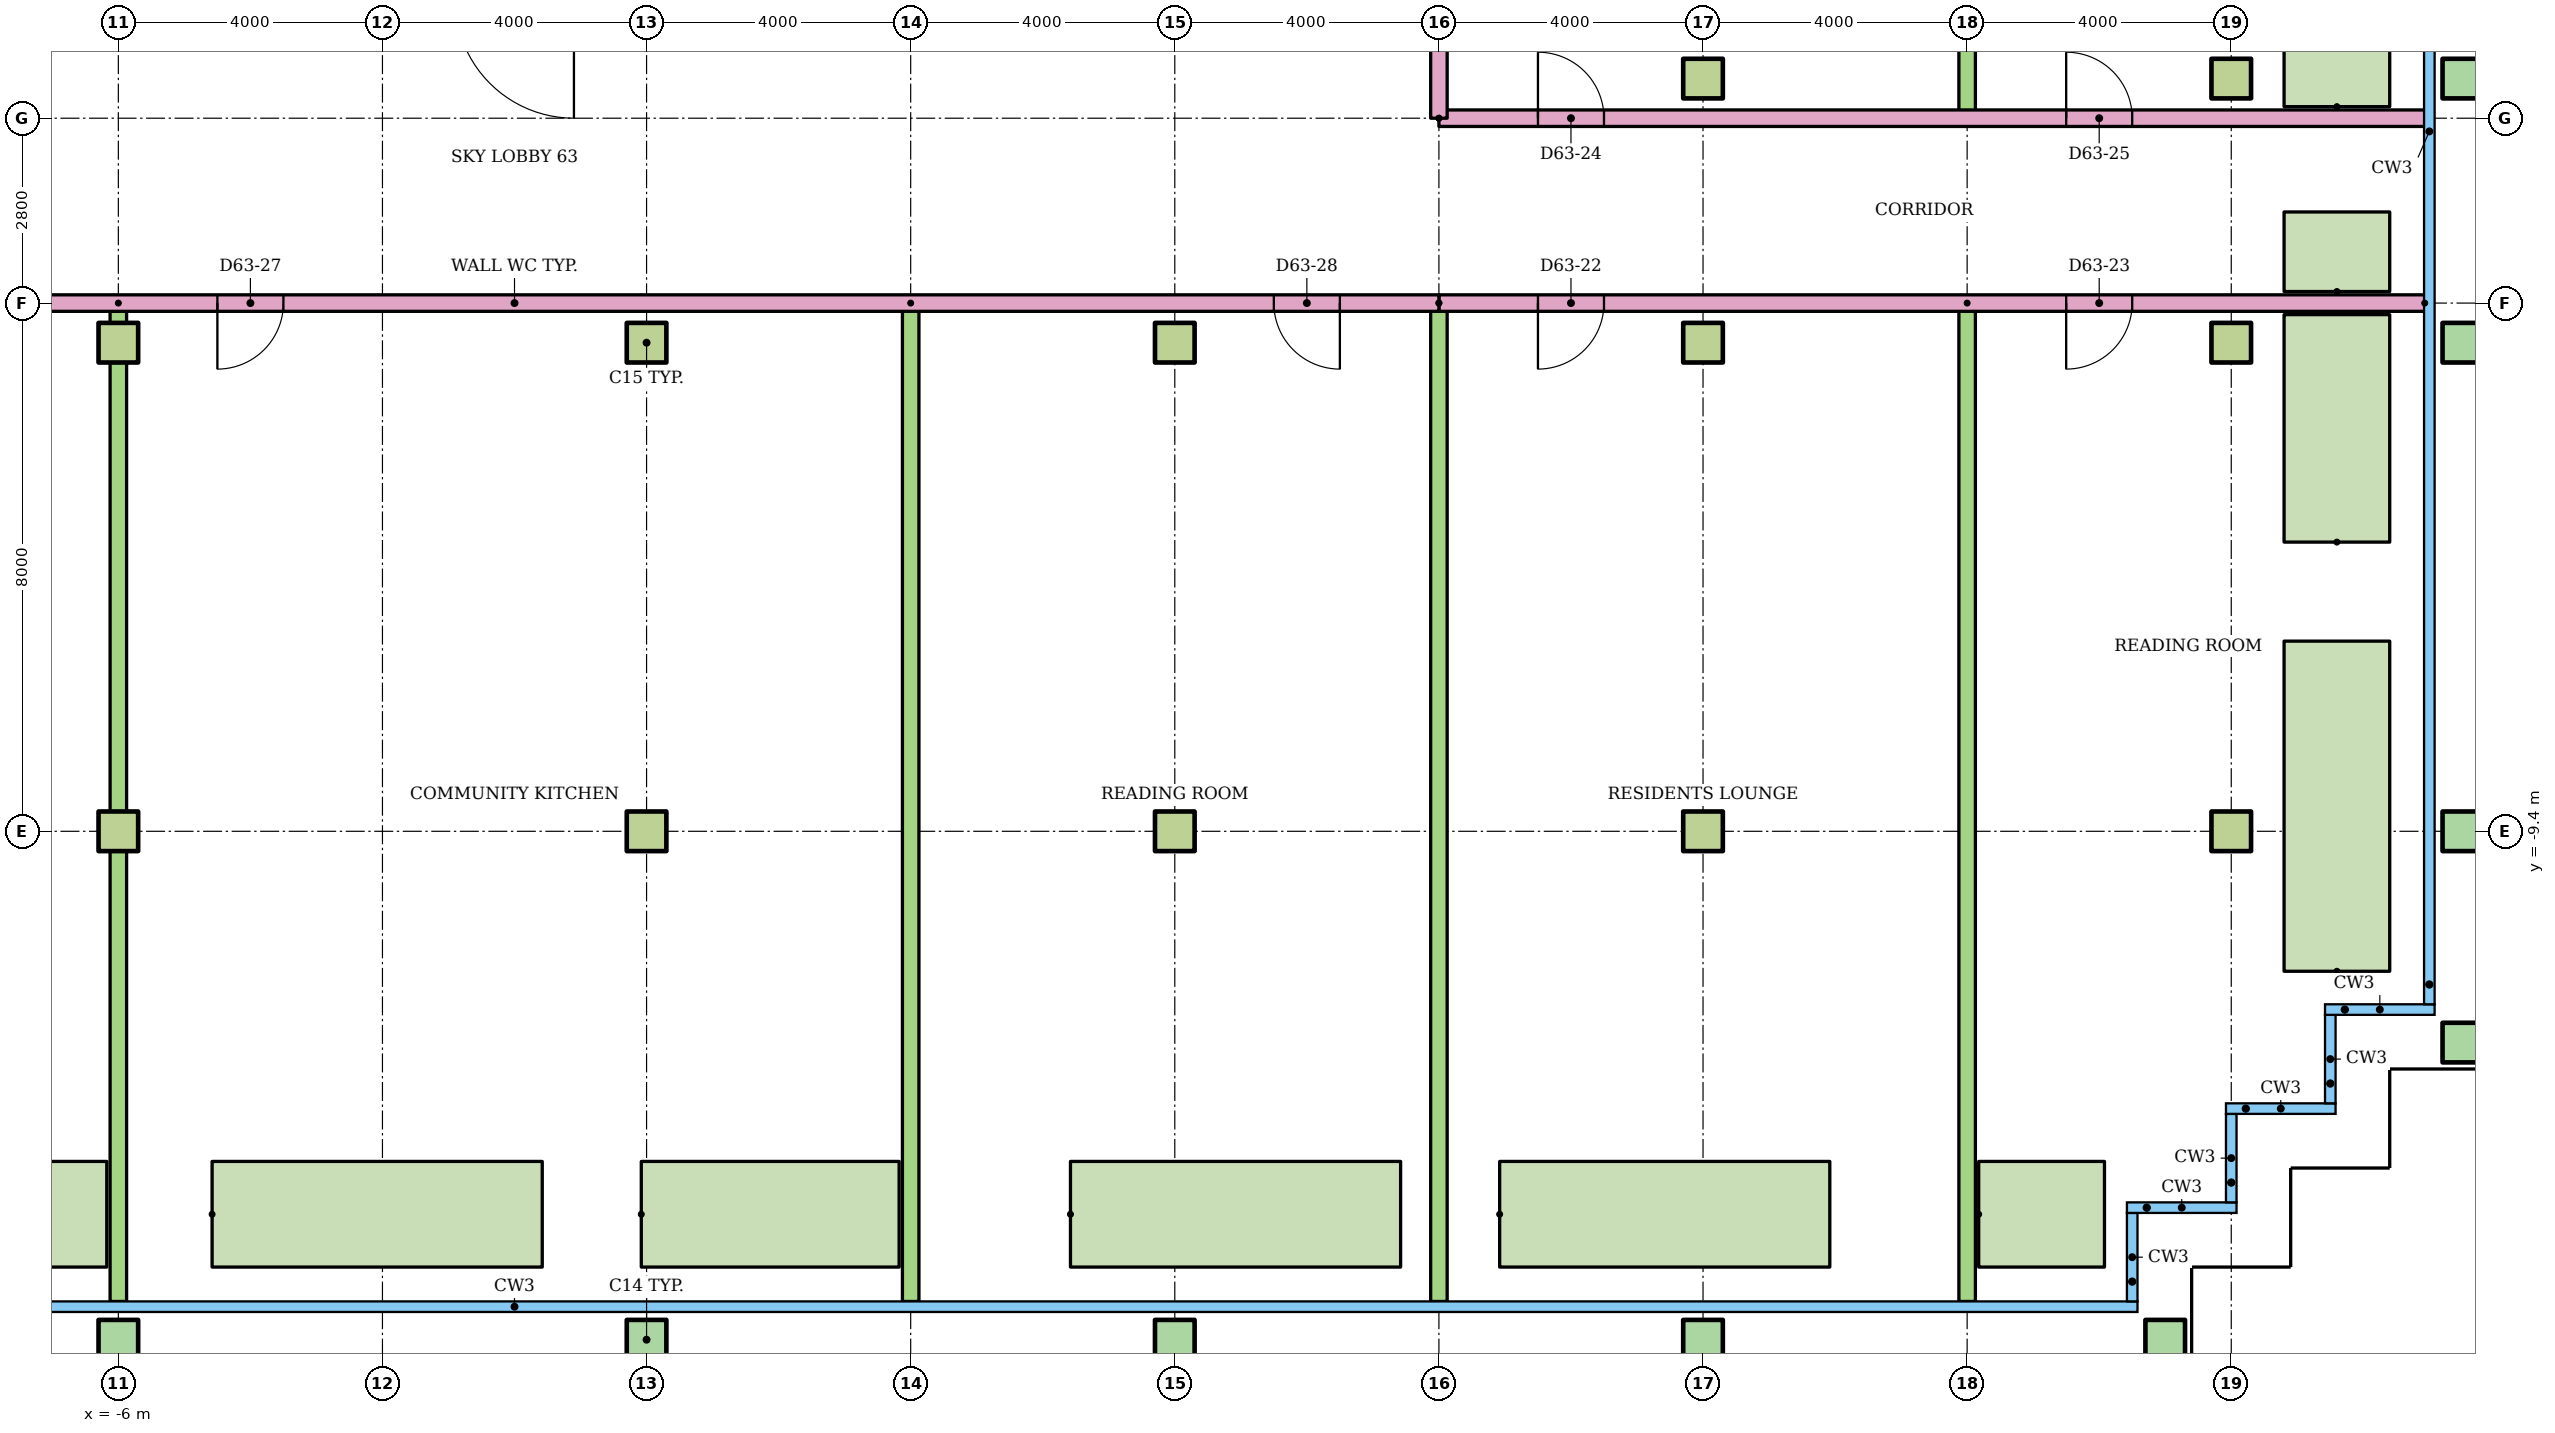
"""IFC4 building model, lengths in metres.
Left out: names, types, materials, properties, quantities, classifications, styles, units other than length and angle.
Written with IfcOpenShell. Run it as: python <this file> out.ifc"""

import sys

from ifc_helpers import new_model, si_unit, direction, frame, frame_2d, origin, origin_2d, place, context, subcontext, project, spatial, rectangle, hollow_rectangle, extrude, element, fill, save


model = new_model("IFC4")
c1 = context("Model", 3, precision=1e-05, world=origin(), true_north=direction((0.0, 1.0)))
c2 = subcontext(c1, "Body", "Model", "MODEL_VIEW")
j1 = project(units=[si_unit("LENGTHUNIT", "METRE"), si_unit("PLANEANGLEUNIT", "RADIAN")], contexts=[c1])
p1 = place(None, origin())
s1 = spatial("IfcSite", under=j1, at=p1, CompositionType="ELEMENT")
p2 = place(p1, origin())
s2 = spatial("IfcBuilding", under=s1, at=p2, CompositionType="ELEMENT")
p3 = place(p2, frame((0.0, 0.0, 239.6)))
s3 = spatial("IfcBuildingStorey", under=s2, at=p3, CompositionType="ELEMENT", Elevation=239.6)
for number, where in (
    (1, (-6.0, -17.1, 0.0)),
    (2, (2.0, -17.1, 0.0)),
    (3, (10.0, -17.1, 0.0)),
):
    element("IfcColumn", number, at=place(p3, frame(where)), inside=s3, PredefinedType="COLUMN", context=c2, shape_type="SweptSolid", body=[
        extrude(hollow_rectangle(XDim=0.6, YDim=0.6, WallThickness=0.03, at=origin_2d()), origin(), (0.0, 0.0, 1.0), 9.25),
    ])
for number, where in (
    (4, (18.0, -17.1, 0.0)),
    (5, (25.0, -17.1, 0.0)),
    (6, (29.5, -12.6, 0.0)),
):
    element("IfcColumn", number, at=place(p3, frame(where)), inside=s3, PredefinedType="COLUMN", context=c2, shape_type="SweptSolid", body=[
        extrude(hollow_rectangle(XDim=0.6, YDim=0.6, WallThickness=0.03, at=origin_2d()), origin(), (0.0, 0.0, 1.0), 8.8),
    ])
for number, where in (
    (7, (-6.0, -9.4, 0.0)),
    (8, (2.0, -9.4, 0.0)),
    (9, (10.0, -9.4, 0.0)),
    (10, (18.0, -9.4, 0.0)),
    (11, (26.0, -9.4, 0.0)),
):
    element("IfcColumn", number, at=place(p3, frame(where)), inside=s3, PredefinedType="COLUMN", context=c2, shape_type="SweptSolid", body=[
        extrude(rectangle(XDim=0.6, YDim=0.6, at=origin_2d()), origin(), (0.0, 0.0, 1.0), 8.8),
    ])
p4 = place(p3, frame((29.5, -9.4, 0.0)))
e12 = element("IfcColumn", 12, at=p4, inside=s3, PredefinedType="COLUMN", context=c2, shape_type="SweptSolid", body=[
    extrude(hollow_rectangle(XDim=0.6, YDim=0.6, WallThickness=0.03, at=origin_2d()), origin(), (0.0, 0.0, 1.0), 8.8),
])
for number, where in (
    (13, (-6.0, -2.0, 0.0)),
    (14, (2.0, -2.0, 0.0)),
    (15, (10.0, -2.0, 0.0)),
    (16, (18.0, -2.0, 0.0)),
    (17, (26.0, -2.0, 0.0)),
):
    element("IfcColumn", number, at=place(p3, frame(where)), inside=s3, PredefinedType="COLUMN", context=c2, shape_type="SweptSolid", body=[
        extrude(rectangle(XDim=0.6, YDim=0.6, at=origin_2d()), origin(), (0.0, 0.0, 1.0), 8.8),
    ])
p5 = place(p3, frame((29.5, -2.0, 0.0)))
e18 = element("IfcColumn", 18, at=p5, inside=s3, PredefinedType="COLUMN", context=c2, shape_type="SweptSolid", body=[
    extrude(hollow_rectangle(XDim=0.6, YDim=0.6, WallThickness=0.03, at=origin_2d()), origin(), (0.0, 0.0, 1.0), 8.8),
])
for number, where in (
    (19, (18.0, 2.0, 0.0)),
    (20, (26.0, 2.0, 0.0)),
):
    element("IfcColumn", number, at=place(p3, frame(where)), inside=s3, PredefinedType="COLUMN", context=c2, shape_type="SweptSolid", body=[
        extrude(rectangle(XDim=0.6, YDim=0.6, at=origin_2d()), origin(), (0.0, 0.0, 1.0), 8.8),
    ])
p6 = place(p3, frame((29.5, 2.0, 0.0)))
e21 = element("IfcColumn", 21, at=p6, inside=s3, PredefinedType="COLUMN", context=c2, shape_type="SweptSolid", body=[
    extrude(hollow_rectangle(XDim=0.6, YDim=0.6, WallThickness=0.03, at=origin_2d()), origin(), (0.0, 0.0, 1.0), 8.8),
])
for number, where in (
    (22, (-4.58, -15.2, 0.0)),
    (23, (8.42, -15.2, 0.0)),
    (24, (14.92, -15.2, 0.0)),
):
    element("IfcWall", number, at=place(p3, frame(where)), inside=s3, PredefinedType="STANDARD", context=c2, shape_type="SweptSolid", body=[
        extrude(rectangle(XDim=5.0, YDim=1.6, at=frame_2d((2.5, 0.0))), origin(), (0.0, 0.0, 1.0), 0.8),
    ])
p7 = place(p3, frame((27.6, -11.52, 0.0), z_axis=(0.0, 0.0, 1.0), x_axis=(0.0, 1.0, 0.0)))
e25 = element("IfcWall", 25, at=p7, inside=s3, PredefinedType="STANDARD", context=c2, shape_type="SweptSolid", body=[
    extrude(rectangle(XDim=5.0, YDim=1.6, at=frame_2d((2.5, 0.0))), origin(), (0.0, 0.0, 1.0), 0.8),
])
p8 = place(p3, frame((28.93, -1.4, 0.0), z_axis=(0.0, 0.0, 1.0), x_axis=(-1.0, 0.0, 0.0)))
e26 = element("IfcWall", 26, at=p8, inside=s3, PredefinedType="PARTITIONING", context=c2, shape_type="SweptSolid", body=[
    extrude(rectangle(XDim=14.93, YDim=0.25, at=frame_2d((7.465, 0.0))), origin(), (0.0, 0.0, 1.0), 8.8),
])
p9 = place(p8, frame((12.43, 0.0, 0.0)))
e27 = element("IfcOpeningElement", 27, at=p9, cuts=e26, PredefinedType="OPENING", context=c2, shape_type="SweptSolid", body=[
    extrude(rectangle(XDim=1.0, YDim=2.1, at=frame_2d((0.5, 1.05))), frame((0.0, 0.135, 0.0), z_axis=(0.0, -1.0, 0.0), x_axis=(1.0, 0.0, 0.0)), (0.0, 0.0, 1.0), 0.27),
])
p10 = place(p8, frame((4.43, 0.0, 0.0)))
e28 = element("IfcOpeningElement", 28, at=p10, cuts=e26, PredefinedType="OPENING", context=c2, shape_type="SweptSolid", body=[
    extrude(rectangle(XDim=1.0, YDim=2.1, at=frame_2d((0.5, 1.05))), frame((0.0, 0.135, 0.0), z_axis=(0.0, -1.0, 0.0), x_axis=(1.0, 0.0, 0.0)), (0.0, 0.0, 1.0), 0.27),
])
for number, where, z_axis, x_axis in (
    (29, (14.0, -1.4, 0.0), (0.0, 0.0, 1.0), (0.0, -1.0, 0.0)),
    (30, (22.0, -1.4, 0.0), (0.0, 0.0, 1.0), (0.0, -1.0, 0.0)),
):
    element("IfcWall", number, at=place(p3, frame(where, z_axis=z_axis, x_axis=x_axis)), inside=s3, PredefinedType="PARTITIONING", context=c2, shape_type="SweptSolid", body=[
        extrude(rectangle(XDim=15.121, YDim=0.25, at=frame_2d((7.561, 0.0))), origin(), (0.0, 0.0, 1.0), 8.8),
    ])
p11 = place(p3, frame((14.0, 1.4, 0.0)))
e31 = element("IfcWall", 31, at=p11, inside=s3, PredefinedType="PARTITIONING", context=c2, shape_type="SweptSolid", body=[
    extrude(rectangle(XDim=14.93, YDim=0.25, at=frame_2d((7.465, 0.0))), origin(), (0.0, 0.0, 1.0), 8.8),
])
p12 = place(p11, frame((1.5, 0.0, 0.0)))
e32 = element("IfcOpeningElement", 32, at=p12, cuts=e31, PredefinedType="OPENING", context=c2, shape_type="SweptSolid", body=[
    extrude(rectangle(XDim=1.0, YDim=2.1, at=frame_2d((0.5, 1.05))), frame((0.0, 0.135, 0.0), z_axis=(0.0, -1.0, 0.0), x_axis=(1.0, 0.0, 0.0)), (0.0, 0.0, 1.0), 0.27),
])
p13 = place(p11, frame((9.5, 0.0, 0.0)))
e33 = element("IfcOpeningElement", 33, at=p13, cuts=e31, PredefinedType="OPENING", context=c2, shape_type="SweptSolid", body=[
    extrude(rectangle(XDim=1.0, YDim=2.1, at=frame_2d((0.5, 1.05))), frame((0.0, 0.135, 0.0), z_axis=(0.0, -1.0, 0.0), x_axis=(1.0, 0.0, 0.0)), (0.0, 0.0, 1.0), 0.27),
])
p14 = place(p3, frame((22.0, 18.921, 0.0), z_axis=(0.0, 0.0, 1.0), x_axis=(0.0, -1.0, 0.0)))
e34 = element("IfcWall", 34, at=p14, inside=s3, PredefinedType="PARTITIONING", context=c2, shape_type="SweptSolid", body=[
    extrude(rectangle(XDim=17.521, YDim=0.25, at=frame_2d((8.76, 0.0))), origin(), (0.0, 0.0, 1.0), 8.8),
])
for number, where, z_axis, x_axis in (
    (35, (-6.0, -1.4, 0.0), (0.0, 0.0, 1.0), (0.0, -1.0, 0.0)),
    (36, (6.0, -1.4, 0.0), (0.0, 0.0, 1.0), (0.0, -1.0, 0.0)),
):
    element("IfcWall", number, at=place(p3, frame(where, z_axis=z_axis, x_axis=x_axis)), inside=s3, PredefinedType="PARTITIONING", context=c2, shape_type="SweptSolid", body=[
        extrude(rectangle(XDim=15.121, YDim=0.25, at=frame_2d((7.561, 0.0))), origin(), (0.0, 0.0, 1.0), 8.8),
    ])
p15 = place(p3, frame((14.0, -1.4, 0.0), z_axis=(0.0, 0.0, 1.0), x_axis=(-1.0, 0.0, 0.0)))
e37 = element("IfcWall", 37, at=p15, inside=s3, PredefinedType="PARTITIONING", context=c2, shape_type="SweptSolid", body=[
    extrude(rectangle(XDim=28.0, YDim=0.25, at=frame_2d((14.0, 0.0))), origin(), (0.0, 0.0, 1.0), 8.8),
])
p16 = place(p15, frame((25.5, 0.0, 0.0)))
e38 = element("IfcOpeningElement", 38, at=p16, cuts=e37, PredefinedType="OPENING", context=c2, shape_type="SweptSolid", body=[
    extrude(rectangle(XDim=1.0, YDim=2.1, at=frame_2d((0.5, 1.05))), frame((0.0, 0.135, 0.0), z_axis=(0.0, -1.0, 0.0), x_axis=(1.0, 0.0, 0.0)), (0.0, 0.0, 1.0), 0.27),
])
p17 = place(p15, frame((17.5, 0.0, 0.0)))
e39 = element("IfcOpeningElement", 39, at=p17, cuts=e37, PredefinedType="OPENING", context=c2, shape_type="SweptSolid", body=[
    extrude(rectangle(XDim=1.0, YDim=2.1, at=frame_2d((0.5, 1.05))), frame((0.0, 0.135, 0.0), z_axis=(0.0, -1.0, 0.0), x_axis=(1.0, 0.0, 0.0)), (0.0, 0.0, 1.0), 0.27),
])
p18 = place(p15, frame((1.5, 0.0, 0.0)))
e40 = element("IfcOpeningElement", 40, at=p18, cuts=e37, PredefinedType="OPENING", context=c2, shape_type="SweptSolid", body=[
    extrude(rectangle(XDim=1.0, YDim=2.1, at=frame_2d((0.5, 1.05))), frame((0.0, 0.135, 0.0), z_axis=(0.0, -1.0, 0.0), x_axis=(1.0, 0.0, 0.0)), (0.0, 0.0, 1.0), 0.27),
])
p19 = place(p3, frame((14.0, 1.4, 0.0), z_axis=(0.0, 0.0, 1.0), x_axis=(0.0, 1.0, 0.0)))
e41 = element("IfcWall", 41, at=p19, inside=s3, PredefinedType="PARTITIONING", context=c2, shape_type="SweptSolid", body=[
    extrude(rectangle(XDim=1.6, YDim=0.25, at=frame_2d((0.8, 0.0))), origin(), (0.0, 0.0, 1.0), 8.8),
])
p20 = place(p3, frame((-11.08, -15.2, 0.0)))
e42 = element("IfcWall", 42, at=p20, inside=s3, PredefinedType="STANDARD", context=c2, shape_type="SweptSolid", body=[
    extrude(rectangle(XDim=4.905, YDim=1.6, at=frame_2d((2.453, 0.0))), origin(), (0.0, 0.0, 1.0), 0.8),
])
p21 = place(p3, frame((1.92, -15.2, 0.0)))
e43 = element("IfcWall", 43, at=p21, inside=s3, PredefinedType="STANDARD", context=c2, shape_type="SweptSolid", body=[
    extrude(rectangle(XDim=3.905, YDim=1.6, at=frame_2d((1.953, 0.0))), origin(), (0.0, 0.0, 1.0), 0.8),
])
p22 = place(p3, frame((22.175, -15.2, 0.0)))
e44 = element("IfcWall", 44, at=p22, inside=s3, PredefinedType="STANDARD", context=c2, shape_type="SweptSolid", body=[
    extrude(rectangle(XDim=1.905, YDim=1.6, at=frame_2d((0.953, 0.0))), origin(), (0.0, 0.0, 1.0), 0.8),
])
p23 = place(p3, frame((27.6, -5.02, 0.0), z_axis=(0.0, 0.0, 1.0), x_axis=(0.0, 1.0, 0.0)))
e45 = element("IfcWall", 45, at=p23, inside=s3, PredefinedType="STANDARD", context=c2, shape_type="SweptSolid", body=[
    extrude(rectangle(XDim=3.445, YDim=1.6, at=frame_2d((1.723, 0.0))), origin(), (0.0, 0.0, 1.0), 0.8),
])
p24 = place(p3, frame((27.6, -1.225, 0.0), z_axis=(0.0, 0.0, 1.0), x_axis=(0.0, 1.0, 0.0)))
e46 = element("IfcWall", 46, at=p24, inside=s3, PredefinedType="STANDARD", context=c2, shape_type="SweptSolid", body=[
    extrude(rectangle(XDim=1.205, YDim=1.6, at=frame_2d((0.603, 0.0))), origin(), (0.0, 0.0, 1.0), 0.8),
])
p25 = place(p3, frame((27.6, 1.575, 0.0), z_axis=(0.0, 0.0, 1.0), x_axis=(0.0, 1.0, 0.0)))
e47 = element("IfcWall", 47, at=p25, inside=s3, PredefinedType="STANDARD", context=c2, shape_type="SweptSolid", body=[
    extrude(rectangle(XDim=4.905, YDim=1.6, at=frame_2d((2.453, 0.0))), origin(), (0.0, 0.0, 1.0), 0.8),
])
p26 = place(p9, origin())
e48 = element("IfcDoor", 48, at=p26, inside=s3, OperationType="SINGLE_SWING_RIGHT", PredefinedType="DOOR", context=c2, shape_type="SweptSolid", body=[
    extrude(rectangle(XDim=1.0, YDim=2.1, at=frame_2d((0.5, 1.05))), frame((0.0, 0.025, 0.0), z_axis=(0.0, -1.0, 0.0), x_axis=(1.0, 0.0, 0.0)), (0.0, 0.0, 1.0), 0.05),
])
fill(e27, e48)
p27 = place(p10, origin())
e49 = element("IfcDoor", 49, at=p27, inside=s3, OperationType="SINGLE_SWING_RIGHT", PredefinedType="DOOR", context=c2, shape_type="SweptSolid", body=[
    extrude(rectangle(XDim=1.0, YDim=2.1, at=frame_2d((0.5, 1.05))), frame((0.0, 0.025, 0.0), z_axis=(0.0, -1.0, 0.0), x_axis=(1.0, 0.0, 0.0)), (0.0, 0.0, 1.0), 0.05),
])
fill(e28, e49)
p28 = place(p12, origin())
e50 = element("IfcDoor", 50, at=p28, inside=s3, OperationType="SINGLE_SWING_LEFT", PredefinedType="DOOR", context=c2, shape_type="SweptSolid", body=[
    extrude(rectangle(XDim=1.0, YDim=2.1, at=frame_2d((0.5, 1.05))), frame((0.0, 0.025, 0.0), z_axis=(0.0, -1.0, 0.0), x_axis=(1.0, 0.0, 0.0)), (0.0, 0.0, 1.0), 0.05),
])
fill(e32, e50)
p29 = place(p13, origin())
e51 = element("IfcDoor", 51, at=p29, inside=s3, OperationType="SINGLE_SWING_LEFT", PredefinedType="DOOR", context=c2, shape_type="SweptSolid", body=[
    extrude(rectangle(XDim=1.0, YDim=2.1, at=frame_2d((0.5, 1.05))), frame((0.0, 0.025, 0.0), z_axis=(0.0, -1.0, 0.0), x_axis=(1.0, 0.0, 0.0)), (0.0, 0.0, 1.0), 0.05),
])
fill(e33, e51)
p30 = place(p17, origin())
e52 = element("IfcDoor", 52, at=p30, inside=s3, OperationType="SINGLE_SWING_RIGHT", PredefinedType="DOOR", context=c2, shape_type="SweptSolid", body=[
    extrude(rectangle(XDim=1.0, YDim=2.1, at=frame_2d((0.5, 1.05))), frame((0.0, 0.025, 0.0), z_axis=(0.0, -1.0, 0.0), x_axis=(1.0, 0.0, 0.0)), (0.0, 0.0, 1.0), 0.05),
])
fill(e39, e52)
p31 = place(p18, origin())
e53 = element("IfcDoor", 53, at=p31, inside=s3, OperationType="SINGLE_SWING_LEFT", PredefinedType="DOOR", context=c2, shape_type="SweptSolid", body=[
    extrude(rectangle(XDim=1.0, YDim=2.1, at=frame_2d((0.5, 1.05))), frame((0.0, 0.025, 0.0), z_axis=(0.0, -1.0, 0.0), x_axis=(1.0, 0.0, 0.0)), (0.0, 0.0, 1.0), 0.05),
])
fill(e40, e53)
save(model, sys.argv[1])
